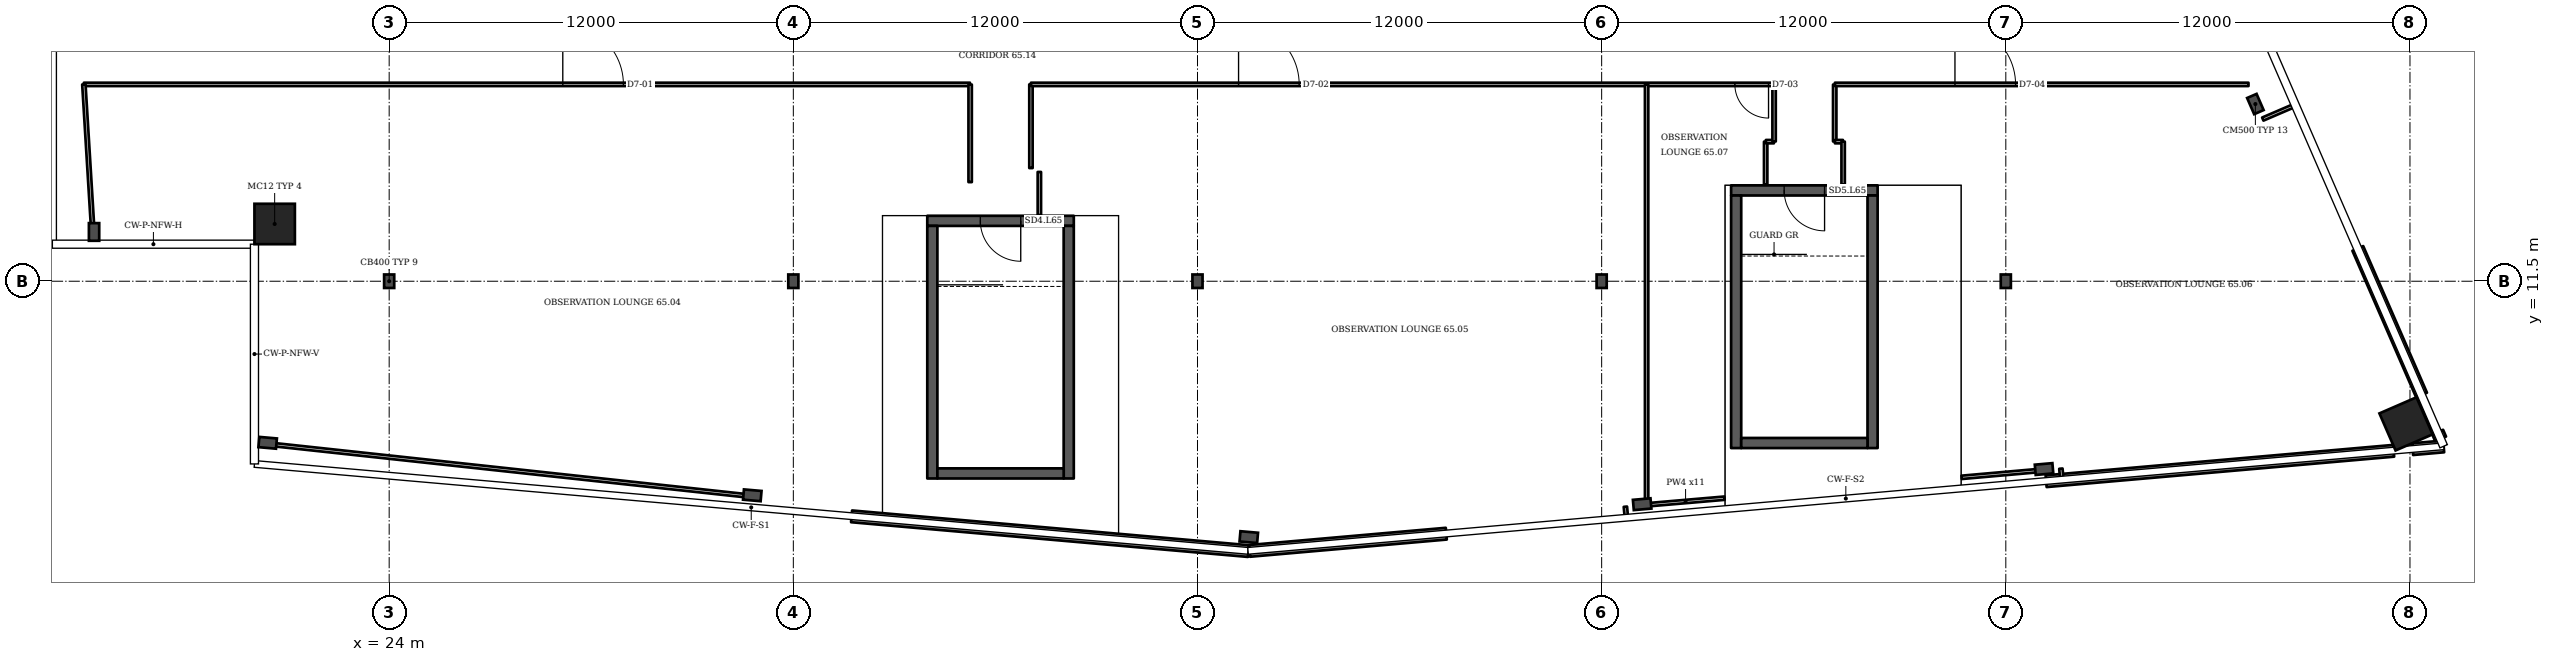
"""IFC4 building model, lengths in metres.
Left out: names, types, materials, properties, quantities, classifications, styles, units other than length and angle.
Written with IfcOpenShell. Run it as: python <this file> out.ifc"""

import sys

from ifc_helpers import new_model, si_unit, direction, frame, frame_2d, origin, origin_2d, place, context, subcontext, project, spatial, rectangle, i_section, extrude, element, fill, save


model = new_model("IFC4")
c1 = context("Model", 3, precision=1e-05, world=origin(), true_north=direction((0.0, 1.0)))
c2 = subcontext(c1, "Body", "Model", "MODEL_VIEW")
j1 = project(units=[si_unit("LENGTHUNIT", "METRE"), si_unit("PLANEANGLEUNIT", "RADIAN")], contexts=[c1])
p1 = place(None, origin())
s1 = spatial("IfcSite", under=j1, at=p1, CompositionType="ELEMENT")
p2 = place(p1, origin())
s2 = spatial("IfcBuilding", under=s1, at=p2, CompositionType="ELEMENT")
p3 = place(p2, frame((0.0, 0.0, 257.5)))
s3 = spatial("IfcBuildingStorey", under=s2, at=p3, CompositionType="ELEMENT", Elevation=257.5)
for number, where, z_axis, x_axis in (
    (1, (20.6, 13.2, 0.0), (0.0, 0.0, 1.0), (1.0, 0.0, 0.0)),
    (2, (83.883, 7.265, 0.0), (0.0, 0.0, 1.0), (-0.399, 0.917, 0.0)),
):
    element("IfcColumn", number, at=place(p3, frame(where, z_axis=z_axis, x_axis=x_axis)), inside=s3, PredefinedType="COLUMN", context=c2, shape_type="SweptSolid", body=[
        extrude(rectangle(XDim=1.2, YDim=1.2, at=origin_2d()), origin(), (0.0, 0.0, 1.0), 3.6),
    ])
for number, where, z_axis, x_axis in (
    (3, (20.392, 6.703, 0.0), (0.0, 0.0, 1.0), (-0.087, -0.996, 0.0)),
    (4, (34.781, 5.143, 0.0), (0.0, 0.0, 1.0), (-0.087, -0.996, 0.0)),
    (5, (49.523, 3.902, 0.0), (0.0, 0.0, 1.0), (-0.087, -0.996, 0.0)),
    (6, (61.202, 4.879, 0.0), (0.0, 0.0, 1.0), (0.087, -0.996, 0.0)),
    (7, (73.135, 5.923, 0.0), (0.0, 0.0, 1.0), (0.087, -0.996, 0.0)),
    (8, (79.41, 16.762, 0.0), (0.0, 0.0, 1.0), (0.917, 0.399, 0.0)),
    (9, (15.238, 12.963, 0.0), (0.0, 0.0, 1.0), (-1.0, 0.0, 0.0)),
):
    element("IfcColumn", number, at=place(p3, frame(where, z_axis=z_axis, x_axis=x_axis)), inside=s3, PredefinedType="COLUMN", context=c2, shape_type="SweptSolid", body=[
        extrude(i_section(OverallWidth=0.306, OverallDepth=0.524, WebThickness=0.021, FlangeThickness=0.04, FilletRadius=0.027, at=origin_2d()), origin(), (0.0, 0.0, 1.0), 3.6),
    ])
for number, where, z_axis, x_axis in (
    (10, (24.0, 11.5, 0.0), (0.0, 0.0, 1.0), (1.0, 0.0, 0.0)),
    (11, (36.0, 11.5, 0.0), (0.0, 0.0, 1.0), (1.0, 0.0, 0.0)),
    (12, (48.0, 11.5, 0.0), (0.0, 0.0, 1.0), (1.0, 0.0, 0.0)),
    (13, (60.0, 11.5, 0.0), (0.0, 0.0, 1.0), (1.0, 0.0, 0.0)),
    (14, (72.0, 11.5, 0.0), (0.0, 0.0, 1.0), (1.0, 0.0, 0.0)),
):
    element("IfcColumn", number, at=place(p3, frame(where, z_axis=z_axis, x_axis=x_axis)), inside=s3, PredefinedType="COLUMN", context=c2, shape_type="SweptSolid", body=[
        extrude(i_section(OverallWidth=0.3, OverallDepth=0.4, WebThickness=0.013, FlangeThickness=0.024, FilletRadius=0.027, at=origin_2d()), origin(), (0.0, 0.0, 1.0), 3.6),
    ])
p4 = place(p3, frame((37.729, 4.519, 0.0), z_axis=(0.0, 0.0, 1.0), x_axis=(0.99619, -0.087167, 0.0)))
e15 = element("IfcWall", 15, at=p4, inside=s3, PredefinedType="SOLIDWALL", context=c2, shape_type="SweptSolid", body=[
    extrude(rectangle(XDim=11.831, YDim=0.35, at=frame_2d((5.915, 0.0))), origin(), (0.0, 0.0, 1.0), 1.0),
])
p5 = place(p3, frame((49.545, 3.493, 0.0), z_axis=(0.0, 0.0, 1.0), x_axis=(0.996196, 0.087138, 0.0)))
e16 = element("IfcWall", 16, at=p5, inside=s3, PredefinedType="SOLIDWALL", context=c2, shape_type="SweptSolid", body=[
    extrude(rectangle(XDim=5.864, YDim=0.35, at=frame_2d((2.932, 0.0))), origin(), (0.0, 0.0, 1.0), 1.0),
])
p6 = place(p3, frame((73.197, 5.562, 0.0), z_axis=(0.0, 0.0, 1.0), x_axis=(0.996198, 0.087163, 0.0)))
e17 = element("IfcWall", 17, at=p6, inside=s3, PredefinedType="SOLIDWALL", context=c2, shape_type="SweptSolid", body=[
    extrude(rectangle(XDim=10.358, YDim=0.35, at=frame_2d((5.179, 0.0))), origin(), (0.0, 0.0, 1.0), 1.0),
])
p7 = place(p3, frame((84.078, 6.514, 0.0), z_axis=(0.0, 0.0, 1.0), x_axis=(0.996213, 0.086971, 0.0)))
e18 = element("IfcWall", 18, at=p7, inside=s3, PredefinedType="SOLIDWALL", context=c2, shape_type="SweptSolid", body=[
    extrude(rectangle(XDim=0.926, YDim=0.35, at=frame_2d((0.463, 0.0))), origin(), (0.0, 0.0, 1.0), 1.0),
])
p8 = place(p3, frame((84.91, 6.819, 0.0), z_axis=(0.0, 0.0, 1.0), x_axis=(-0.398359, 0.91723, 0.0)))
e19 = element("IfcWall", 19, at=p8, inside=s3, PredefinedType="SOLIDWALL", context=c2, shape_type="SweptSolid", body=[
    extrude(rectangle(XDim=0.219, YDim=0.35, at=frame_2d((0.109, 0.0))), origin(), (0.0, 0.0, 1.0), 1.0),
])
p9 = place(p3, frame((84.345, 8.12, 0.0), z_axis=(0.0, 0.0, 1.0), x_axis=(-0.398736, 0.917067, 0.0)))
e20 = element("IfcWall", 20, at=p9, inside=s3, PredefinedType="SOLIDWALL", context=c2, shape_type="SweptSolid", body=[
    extrude(rectangle(XDim=4.748, YDim=0.35, at=frame_2d((2.374, 0.0))), origin(), (0.0, 0.0, 1.0), 1.0),
])
p10 = place(p3, frame((39.977, 13.293, 0.0), z_axis=(0.0, 0.0, 1.0), x_axis=(1.0, 0.0, 0.0)))
e21 = element("IfcWall", 21, at=p10, inside=s3, PredefinedType="SHEAR", context=c2, shape_type="SweptSolid", body=[
    extrude(rectangle(XDim=4.35, YDim=0.3, at=frame_2d((2.175, 0.0))), origin(), (0.0, 0.0, 1.0), 3.2),
])
p11 = place(p10, frame((1.575, 0.0, 0.0)))
e22 = element("IfcOpeningElement", 22, at=p11, cuts=e21, PredefinedType="OPENING", context=c2, shape_type="SweptSolid", body=[
    extrude(rectangle(XDim=1.2, YDim=2.1, at=frame_2d((0.6, 1.05))), frame((0.0, 0.16, 0.0), z_axis=(0.0, -1.0, 0.0), x_axis=(1.0, 0.0, 0.0)), (0.0, 0.0, 1.0), 0.32),
])
p12 = place(p3, frame((63.844, 14.196, 0.0), z_axis=(0.0, 0.0, 1.0), x_axis=(1.0, 0.0, 0.0)))
e23 = element("IfcWall", 23, at=p12, inside=s3, PredefinedType="SHEAR", context=c2, shape_type="SweptSolid", body=[
    extrude(rectangle(XDim=4.35, YDim=0.3, at=frame_2d((2.175, 0.0))), origin(), (0.0, 0.0, 1.0), 3.2),
])
p13 = place(p12, frame((1.575, 0.0, 0.0)))
e24 = element("IfcOpeningElement", 24, at=p13, cuts=e23, PredefinedType="OPENING", context=c2, shape_type="SweptSolid", body=[
    extrude(rectangle(XDim=1.2, YDim=2.1, at=frame_2d((0.6, 1.05))), frame((0.0, 0.16, 0.0), z_axis=(0.0, -1.0, 0.0), x_axis=(1.0, 0.0, 0.0)), (0.0, 0.0, 1.0), 0.32),
])
p14 = place(p3, frame((14.935, 17.345, 0.0), z_axis=(0.0, 0.0, 1.0), x_axis=(1.0, 0.0, 0.0)))
e25 = element("IfcWall", 25, at=p14, inside=s3, PredefinedType="PARTITIONING", context=c2, shape_type="SweptSolid", body=[
    extrude(rectangle(XDim=26.31, YDim=0.1, at=frame_2d((13.155, 0.0))), origin(), (0.0, 0.0, 1.0), 3.2),
])
p15 = place(p14, frame((14.22, 0.0, 0.0)))
e26 = element("IfcOpeningElement", 26, at=p15, cuts=e25, PredefinedType="OPENING", context=c2, shape_type="SweptSolid", body=[
    extrude(rectangle(XDim=1.8, YDim=2.1, at=frame_2d((0.9, 1.05))), frame((0.0, 0.06, 0.0), z_axis=(0.0, -1.0, 0.0), x_axis=(1.0, 0.0, 0.0)), (0.0, 0.0, 1.0), 0.12),
])
p16 = place(p3, frame((15.224, 12.62, 0.0), z_axis=(0.0, 0.0, 1.0), x_axis=(-0.061014, 0.998141, 0.0)))
e27 = element("IfcWall", 27, at=p16, inside=s3, PredefinedType="PARTITIONING", context=c2, shape_type="SweptSolid", body=[
    extrude(rectangle(XDim=4.734, YDim=0.1, at=frame_2d((2.367, 0.0))), origin(), (0.0, 0.0, 1.0), 2.502),
])
p17 = place(p3, frame((34.75, 5.115, 0.0), z_axis=(0.0, 0.0, 1.0), x_axis=(-0.994207, 0.107505, 0.0)))
e28 = element("IfcWall", 28, at=p17, inside=s3, PredefinedType="PARTITIONING", context=c2, shape_type="SweptSolid", body=[
    extrude(rectangle(XDim=14.816, YDim=0.1, at=frame_2d((7.408, 0.0))), origin(), (0.0, 0.0, 1.0), 3.2),
])
p18 = place(p3, frame((41.25, 14.443, 0.0), z_axis=(0.0, 0.0, 1.0), x_axis=(0.0, 1.0, 0.0)))
e29 = element("IfcWall", 29, at=p18, inside=s3, PredefinedType="PARTITIONING", context=c2, shape_type="SweptSolid", body=[
    extrude(rectangle(XDim=2.897, YDim=0.1, at=frame_2d((1.448, 0.0))), origin(), (0.0, 0.0, 1.0), 3.2),
])
p19 = place(p3, frame((43.055, 14.86, 0.0), z_axis=(0.0, 0.0, 1.0), x_axis=(0.0, 1.0, 0.0)))
e30 = element("IfcWall", 30, at=p19, inside=s3, PredefinedType="PARTITIONING", context=c2, shape_type="SweptSolid", body=[
    extrude(rectangle(XDim=2.485, YDim=0.1, at=frame_2d((1.242, 0.0))), origin(), (0.0, 0.0, 1.0), 3.2),
])
p20 = place(p3, frame((43.055, 17.345, 0.0), z_axis=(0.0, 0.0, 1.0), x_axis=(1.0, 0.0, 0.0)))
e31 = element("IfcWall", 31, at=p20, inside=s3, PredefinedType="PARTITIONING", context=c2, shape_type="SweptSolid", body=[
    extrude(rectangle(XDim=22.06, YDim=0.1, at=frame_2d((11.03, 0.0))), origin(), (0.0, 0.0, 1.0), 3.2),
])
p21 = place(p20, frame((6.164, 0.0, 0.0)))
e32 = element("IfcOpeningElement", 32, at=p21, cuts=e31, PredefinedType="OPENING", context=c2, shape_type="SweptSolid", body=[
    extrude(rectangle(XDim=1.8, YDim=2.1, at=frame_2d((0.9, 1.05))), frame((0.0, 0.06, 0.0), z_axis=(0.0, -1.0, 0.0), x_axis=(1.0, 0.0, 0.0)), (0.0, 0.0, 1.0), 0.12),
])
p22 = place(p20, frame((20.9, 0.0, 0.0)))
e33 = element("IfcOpeningElement", 33, at=p22, cuts=e31, PredefinedType="OPENING", context=c2, shape_type="SweptSolid", body=[
    extrude(rectangle(XDim=1.0, YDim=2.1, at=frame_2d((0.5, 1.05))), frame((0.0, 0.06, 0.0), z_axis=(0.0, -1.0, 0.0), x_axis=(1.0, 0.0, 0.0)), (0.0, 0.0, 1.0), 0.12),
])
p23 = place(p3, frame((43.305, 13.463, 0.0), z_axis=(0.0, 0.0, 1.0), x_axis=(0.0, 1.0, 0.0)))
e34 = element("IfcWall", 34, at=p23, inside=s3, PredefinedType="PARTITIONING", context=c2, shape_type="SweptSolid", body=[
    extrude(rectangle(XDim=1.282, YDim=0.1, at=frame_2d((0.641, 0.0))), origin(), (0.0, 0.0, 1.0), 3.2),
])
p24 = place(p3, frame((60.733, 4.497, 0.0), z_axis=(0.0, 0.0, 1.0), x_axis=(-0.090037, 0.995936, 0.0)))
e35 = element("IfcWall", 35, at=p24, inside=s3, PredefinedType="PARTITIONING", context=c2, shape_type="SweptSolid", body=[
    extrude(rectangle(XDim=0.309, YDim=0.1, at=frame_2d((0.155, 0.0))), origin(), (0.0, 0.0, 1.0), 3.2),
])
p25 = place(p3, frame((61.335, 4.86, 0.0), z_axis=(0.0, 0.0, 1.0), x_axis=(0.0, 1.0, 0.0)))
e36 = element("IfcWall", 36, at=p25, inside=s3, PredefinedType="PARTITIONING", context=c2, shape_type="SweptSolid", body=[
    extrude(rectangle(XDim=12.48, YDim=0.1, at=frame_2d((6.24, 0.0))), origin(), (0.0, 0.0, 1.0), 3.2),
])
p26 = place(p3, frame((61.335, 4.86, 0.0), z_axis=(0.0, 0.0, 1.0), x_axis=(0.996359, 0.085264, 0.0)))
e37 = element("IfcWall", 37, at=p26, inside=s3, PredefinedType="PARTITIONING", context=c2, shape_type="SweptSolid", body=[
    extrude(rectangle(XDim=2.322, YDim=0.1, at=frame_2d((1.161, 0.0))), origin(), (0.0, 0.0, 1.0), 3.2),
])
p27 = place(p3, frame((64.87, 14.366, 0.0), z_axis=(0.0, 0.0, 1.0), x_axis=(0.0, 1.0, 0.0)))
e38 = element("IfcWall", 38, at=p27, inside=s3, PredefinedType="PARTITIONING", context=c2, shape_type="SweptSolid", body=[
    extrude(rectangle(XDim=1.279, YDim=0.1, at=frame_2d((0.639, 0.0))), origin(), (0.0, 0.0, 1.0), 3.2),
])
p28 = place(p3, frame((64.875, 15.645, 0.0), z_axis=(0.0, 0.0, 1.0), x_axis=(1.0, 0.0, 0.0)))
e39 = element("IfcWall", 39, at=p28, inside=s3, PredefinedType="PARTITIONING", context=c2, shape_type="SweptSolid", body=[
    extrude(rectangle(XDim=0.24, YDim=0.1, at=frame_2d((0.12, 0.0))), origin(), (0.0, 0.0, 1.0), 3.2),
])
for number, where, z_axis, x_axis in (
    (40, (65.12, 15.65, 0.0), (0.0, 0.0, 1.0), (0.0, 1.0, 0.0)),
    (41, (66.92, 15.65, 0.0), (0.0, 0.0, 1.0), (0.0, 1.0, 0.0)),
):
    element("IfcWall", number, at=place(p3, frame(where, z_axis=z_axis, x_axis=x_axis)), inside=s3, PredefinedType="PARTITIONING", context=c2, shape_type="SweptSolid", body=[
        extrude(rectangle(XDim=1.69, YDim=0.1, at=frame_2d((0.845, 0.0))), origin(), (0.0, 0.0, 1.0), 3.2),
    ])
p29 = place(p3, frame((66.925, 15.645, 0.0), z_axis=(0.0, 0.0, 1.0), x_axis=(1.0, 0.0, 0.0)))
e42 = element("IfcWall", 42, at=p29, inside=s3, PredefinedType="PARTITIONING", context=c2, shape_type="SweptSolid", body=[
    extrude(rectangle(XDim=0.24, YDim=0.1, at=frame_2d((0.12, 0.0))), origin(), (0.0, 0.0, 1.0), 3.2),
])
p30 = place(p3, frame((66.925, 17.345, 0.0), z_axis=(0.0, 0.0, 1.0), x_axis=(1.0, 0.0, 0.0)))
e43 = element("IfcWall", 43, at=p30, inside=s3, PredefinedType="PARTITIONING", context=c2, shape_type="SweptSolid", body=[
    extrude(rectangle(XDim=12.28, YDim=0.1, at=frame_2d((6.14, 0.0))), origin(), (0.0, 0.0, 1.0), 3.2),
])
p31 = place(p30, frame((3.565, 0.0, 0.0)))
e44 = element("IfcOpeningElement", 44, at=p31, cuts=e43, PredefinedType="OPENING", context=c2, shape_type="SweptSolid", body=[
    extrude(rectangle(XDim=1.8, YDim=2.1, at=frame_2d((0.9, 1.05))), frame((0.0, 0.06, 0.0), z_axis=(0.0, -1.0, 0.0), x_axis=(1.0, 0.0, 0.0)), (0.0, 0.0, 1.0), 0.12),
])
p32 = place(p3, frame((67.17, 14.366, 0.0), z_axis=(0.0, 0.0, 1.0), x_axis=(0.0, 1.0, 0.0)))
e45 = element("IfcWall", 45, at=p32, inside=s3, PredefinedType="PARTITIONING", context=c2, shape_type="SweptSolid", body=[
    extrude(rectangle(XDim=1.279, YDim=0.1, at=frame_2d((0.639, 0.0))), origin(), (0.0, 0.0, 1.0), 3.2),
])
p33 = place(p3, frame((70.689, 5.677, 0.0), z_axis=(0.0, 0.0, 1.0), x_axis=(0.996136, 0.087799, 0.0)))
e46 = element("IfcWall", 46, at=p33, inside=s3, PredefinedType="PARTITIONING", context=c2, shape_type="SweptSolid", body=[
    extrude(rectangle(XDim=2.486, YDim=0.1, at=frame_2d((1.243, 0.0))), origin(), (0.0, 0.0, 1.0), 3.2),
])
p34 = place(p3, frame((73.663, 5.628, 0.0), z_axis=(0.0, 0.0, 1.0), x_axis=(-0.091893, 0.995772, 0.0)))
e47 = element("IfcWall", 47, at=p34, inside=s3, PredefinedType="PARTITIONING", context=c2, shape_type="SweptSolid", body=[
    extrude(rectangle(XDim=0.308, YDim=0.1, at=frame_2d((0.154, 0.0))), origin(), (0.0, 0.0, 1.0), 3.2),
])
p35 = place(p3, frame((79.63, 16.315, 0.0), z_axis=(0.0, 0.0, 1.0), x_axis=(0.918616, 0.395147, 0.0)))
e48 = element("IfcWall", 48, at=p35, inside=s3, PredefinedType="PARTITIONING", context=c2, shape_type="SweptSolid", body=[
    extrude(rectangle(XDim=1.031, YDim=0.1, at=frame_2d((0.516, 0.0))), origin(), (0.0, 0.0, 1.0), 3.2),
])
for number, where, z_axis, x_axis in (
    (49, (40.127, 5.643, 0.0), (0.0, 0.0, 1.0), (0.0, 1.0, 0.0)),
    (50, (44.177, 5.643, 0.0), (0.0, 0.0, 1.0), (0.0, 1.0, 0.0)),
):
    element("IfcWall", number, at=place(p3, frame(where, z_axis=z_axis, x_axis=x_axis)), inside=s3, PredefinedType="SHEAR", context=c2, shape_type="SweptSolid", body=[
        extrude(rectangle(XDim=7.5, YDim=0.3, at=frame_2d((3.75, 0.0))), origin(), (0.0, 0.0, 1.0), 3.2),
    ])
p36 = place(p3, frame((40.277, 5.793, 0.0), z_axis=(0.0, 0.0, 1.0), x_axis=(1.0, 0.0, 0.0)))
e51 = element("IfcWall", 51, at=p36, inside=s3, PredefinedType="SHEAR", context=c2, shape_type="SweptSolid", body=[
    extrude(rectangle(XDim=3.75, YDim=0.3, at=frame_2d((1.875, 0.0))), origin(), (0.0, 0.0, 1.0), 3.2),
])
for number, where, z_axis, x_axis in (
    (52, (63.994, 6.546, 0.0), (0.0, 0.0, 1.0), (0.0, 1.0, 0.0)),
    (53, (68.044, 6.546, 0.0), (0.0, 0.0, 1.0), (0.0, 1.0, 0.0)),
):
    element("IfcWall", number, at=place(p3, frame(where, z_axis=z_axis, x_axis=x_axis)), inside=s3, PredefinedType="SHEAR", context=c2, shape_type="SweptSolid", body=[
        extrude(rectangle(XDim=7.5, YDim=0.3, at=frame_2d((3.75, 0.0))), origin(), (0.0, 0.0, 1.0), 3.2),
    ])
p37 = place(p3, frame((64.144, 6.696, 0.0), z_axis=(0.0, 0.0, 1.0), x_axis=(1.0, 0.0, 0.0)))
e54 = element("IfcWall", 54, at=p37, inside=s3, PredefinedType="SHEAR", context=c2, shape_type="SweptSolid", body=[
    extrude(rectangle(XDim=3.75, YDim=0.3, at=frame_2d((1.875, 0.0))), origin(), (0.0, 0.0, 1.0), 3.2),
])
p38 = place(p11, origin())
e55 = element("IfcDoor", 55, at=p38, inside=s3, OperationType="SINGLE_SWING_RIGHT", PredefinedType="DOOR", context=c2, shape_type="SweptSolid", body=[
    extrude(rectangle(XDim=1.2, YDim=2.1, at=frame_2d((0.6, 1.05))), frame((0.0, 0.025, 0.0), z_axis=(0.0, -1.0, 0.0), x_axis=(1.0, 0.0, 0.0)), (0.0, 0.0, 1.0), 0.05),
])
fill(e22, e55)
p39 = place(p13, origin())
e56 = element("IfcDoor", 56, at=p39, inside=s3, OperationType="SINGLE_SWING_RIGHT", PredefinedType="DOOR", context=c2, shape_type="SweptSolid", body=[
    extrude(rectangle(XDim=1.2, YDim=2.1, at=frame_2d((0.6, 1.05))), frame((0.0, 0.025, 0.0), z_axis=(0.0, -1.0, 0.0), x_axis=(1.0, 0.0, 0.0)), (0.0, 0.0, 1.0), 0.05),
])
fill(e24, e56)
p40 = place(p15, origin())
e57 = element("IfcDoor", 57, at=p40, inside=s3, OperationType="DOUBLE_DOOR_SINGLE_SWING", PredefinedType="DOOR", context=c2, shape_type="SweptSolid", body=[
    extrude(rectangle(XDim=1.8, YDim=2.1, at=frame_2d((0.9, 1.05))), frame((0.0, 0.025, 0.0), z_axis=(0.0, -1.0, 0.0), x_axis=(1.0, 0.0, 0.0)), (0.0, 0.0, 1.0), 0.05),
])
fill(e26, e57)
p41 = place(p21, origin())
e58 = element("IfcDoor", 58, at=p41, inside=s3, OperationType="DOUBLE_DOOR_SINGLE_SWING", PredefinedType="DOOR", context=c2, shape_type="SweptSolid", body=[
    extrude(rectangle(XDim=1.8, YDim=2.1, at=frame_2d((0.9, 1.05))), frame((0.0, 0.025, 0.0), z_axis=(0.0, -1.0, 0.0), x_axis=(1.0, 0.0, 0.0)), (0.0, 0.0, 1.0), 0.05),
])
fill(e32, e58)
p42 = place(p22, origin())
e59 = element("IfcDoor", 59, at=p42, inside=s3, OperationType="SINGLE_SWING_RIGHT", PredefinedType="DOOR", context=c2, shape_type="SweptSolid", body=[
    extrude(rectangle(XDim=1.0, YDim=2.1, at=frame_2d((0.5, 1.05))), frame((0.0, 0.025, 0.0), z_axis=(0.0, -1.0, 0.0), x_axis=(1.0, 0.0, 0.0)), (0.0, 0.0, 1.0), 0.05),
])
fill(e33, e59)
p43 = place(p31, origin())
e60 = element("IfcDoor", 60, at=p43, inside=s3, OperationType="DOUBLE_DOOR_SINGLE_SWING", PredefinedType="DOOR", context=c2, shape_type="SweptSolid", body=[
    extrude(rectangle(XDim=1.8, YDim=2.1, at=frame_2d((0.9, 1.05))), frame((0.0, 0.025, 0.0), z_axis=(0.0, -1.0, 0.0), x_axis=(1.0, 0.0, 0.0)), (0.0, 0.0, 1.0), 0.05),
])
fill(e44, e60)
save(model, sys.argv[1])
